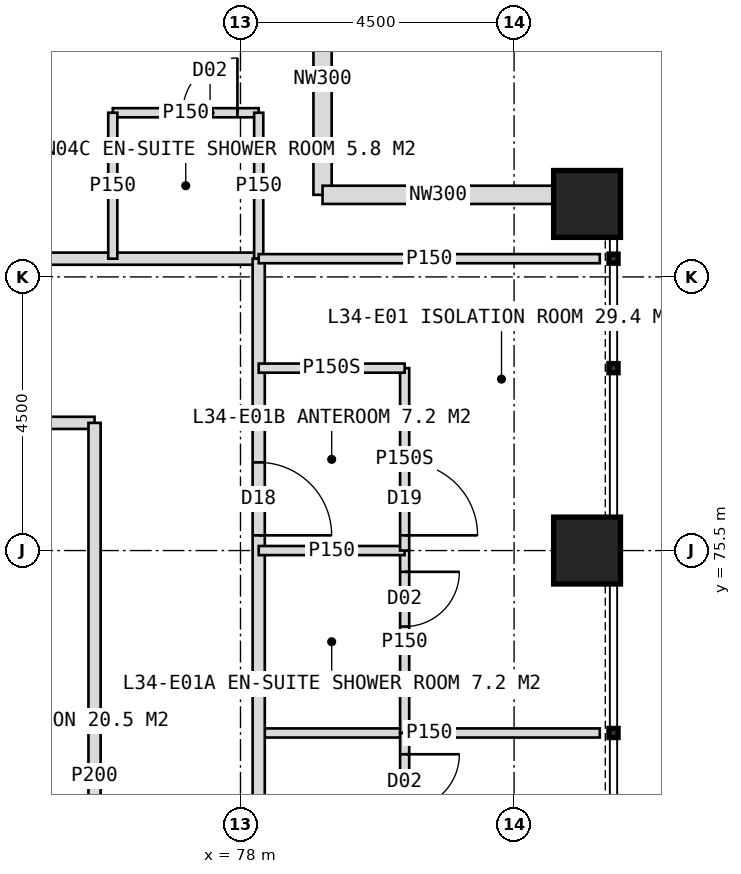
"""IFC4 building model, lengths in metres.
Left out: names, types, materials, properties, quantities, classifications, styles, units other than length and angle.
Written with IfcOpenShell. Run it as: python <this file> out.ifc"""

import sys

from ifc_helpers import new_model, si_unit, direction, frame, frame_2d, origin, origin_2d, place, context, subcontext, project, spatial, rectangle, hollow_rectangle, extrude, element, fill, save


model = new_model("IFC4")
c1 = context("Model", 3, precision=1e-05, world=origin(), true_north=direction((0.0, 1.0)))
c2 = subcontext(c1, "Body", "Model", "MODEL_VIEW")
j1 = project(units=[si_unit("LENGTHUNIT", "METRE"), si_unit("PLANEANGLEUNIT", "RADIAN")], contexts=[c1])
p1 = place(None, origin())
s1 = spatial("IfcSite", under=j1, at=p1, CompositionType="ELEMENT")
p2 = place(p1, origin())
s2 = spatial("IfcBuilding", under=s1, at=p2, CompositionType="ELEMENT")
p3 = place(p2, frame((0.0, 0.0, 144.0)))
s3 = spatial("IfcBuildingStorey", under=s2, at=p3, CompositionType="ELEMENT", Elevation=144.0)
for number, where, z_axis, x_axis in (
    (1, (83.7, 75.5, 0.0), (0.0, 0.0, 1.0), (1.0, 0.0, 0.0)),
    (2, (83.7, 81.2, 0.0), (0.0, 0.0, 1.0), (1.0, 0.0, 0.0)),
):
    element("IfcColumn", number, at=place(p3, frame(where, z_axis=z_axis, x_axis=x_axis)), inside=s3, PredefinedType="COLUMN", context=c2, shape_type="SweptSolid", body=[
        extrude(hollow_rectangle(XDim=1.1, YDim=1.1, WallThickness=0.1, at=origin_2d()), origin(), (0.0, 0.0, 1.0), 4.0),
    ])
for number, where, z_axis, x_axis in (
    (3, (79.35, 85.15, 0.0), (0.0, 0.0, 1.0), (0.0, -1.0, 0.0)),
    (4, (79.35, 81.35, 0.0), (0.0, 0.0, 1.0), (1.0, 0.0, 0.0)),
):
    element("IfcWall", number, at=place(p3, frame(where, z_axis=z_axis, x_axis=x_axis)), inside=s3, PredefinedType="ELEMENTEDWALL", context=c2, shape_type="SweptSolid", body=[
        extrude(rectangle(XDim=3.8, YDim=0.3, at=frame_2d((1.9, 0.0))), origin(), (0.0, 0.0, 1.0), 4.0),
    ])
p4 = place(p3, frame((41.7, 80.3, 0.0), z_axis=(0.0, 0.0, 1.0), x_axis=(1.0, 0.0, 0.0)))
e5 = element("IfcWall", 5, at=p4, inside=s3, PredefinedType="PARTITIONING", context=c2, shape_type="SweptSolid", body=[
    extrude(rectangle(XDim=36.6, YDim=0.2, at=frame_2d((18.3, 0.0))), origin(), (0.0, 0.0, 1.0), 3.75),
])
p5 = place(p4, frame((3.35, 0.0, 0.0)))
e6 = element("IfcOpeningElement", 6, at=p5, cuts=e5, PredefinedType="OPENING", context=c2, shape_type="SweptSolid", body=[
    extrude(rectangle(XDim=1.2, YDim=2.2, at=frame_2d((0.6, 1.1))), frame((0.0, 0.11, 0.0), z_axis=(0.0, -1.0, 0.0), x_axis=(1.0, 0.0, 0.0)), (0.0, 0.0, 1.0), 0.22),
])
p6 = place(p4, frame((8.8, 0.0, 0.0)))
e7 = element("IfcOpeningElement", 7, at=p6, cuts=e5, PredefinedType="OPENING", context=c2, shape_type="SweptSolid", body=[
    extrude(rectangle(XDim=1.0, YDim=2.1, at=frame_2d((0.5, 1.05))), frame((0.0, 0.11, 0.0), z_axis=(0.0, -1.0, 0.0), x_axis=(1.0, 0.0, 0.0)), (0.0, 0.0, 1.0), 0.22),
])
p7 = place(p4, frame((15.35, 0.0, 0.0)))
e8 = element("IfcOpeningElement", 8, at=p7, cuts=e5, PredefinedType="OPENING", context=c2, shape_type="SweptSolid", body=[
    extrude(rectangle(XDim=1.2, YDim=2.2, at=frame_2d((0.6, 1.1))), frame((0.0, 0.11, 0.0), z_axis=(0.0, -1.0, 0.0), x_axis=(1.0, 0.0, 0.0)), (0.0, 0.0, 1.0), 0.22),
])
p8 = place(p4, frame((22.45, 0.0, 0.0)))
e9 = element("IfcOpeningElement", 9, at=p8, cuts=e5, PredefinedType="OPENING", context=c2, shape_type="SweptSolid", body=[
    extrude(rectangle(XDim=1.2, YDim=2.2, at=frame_2d((0.6, 1.1))), frame((0.0, 0.11, 0.0), z_axis=(0.0, -1.0, 0.0), x_axis=(1.0, 0.0, 0.0)), (0.0, 0.0, 1.0), 0.22),
])
p9 = place(p3, frame((75.9, 82.7, 0.0), z_axis=(0.0, 0.0, 1.0), x_axis=(1.0, 0.0, 0.0)))
e10 = element("IfcWall", 10, at=p9, inside=s3, PredefinedType="PARTITIONING", context=c2, shape_type="SweptSolid", body=[
    extrude(rectangle(XDim=2.4, YDim=0.15, at=frame_2d((1.2, 0.0))), origin(), (0.0, 0.0, 1.0), 3.75),
])
p10 = place(p9, frame((1.15, 0.0, 0.0)))
e11 = element("IfcOpeningElement", 11, at=p10, cuts=e10, PredefinedType="OPENING", context=c2, shape_type="SweptSolid", body=[
    extrude(rectangle(XDim=0.9, YDim=2.1, at=frame_2d((0.45, 1.05))), frame((0.0, 0.085, 0.0), z_axis=(0.0, -1.0, 0.0), x_axis=(1.0, 0.0, 0.0)), (0.0, 0.0, 1.0), 0.17),
])
for number, where, z_axis, x_axis in (
    (12, (75.9, 80.3, 0.0), (0.0, 0.0, 1.0), (0.0, 1.0, 0.0)),
    (13, (78.3, 80.3, 0.0), (0.0, 0.0, 1.0), (0.0, 1.0, 0.0)),
):
    element("IfcWall", number, at=place(p3, frame(where, z_axis=z_axis, x_axis=x_axis)), inside=s3, PredefinedType="PARTITIONING", context=c2, shape_type="SweptSolid", body=[
        extrude(rectangle(XDim=2.4, YDim=0.15, at=frame_2d((1.2, 0.0))), origin(), (0.0, 0.0, 1.0), 3.75),
    ])
p11 = place(p3, frame((72.5, 77.6, 0.0), z_axis=(0.0, 0.0, 1.0), x_axis=(1.0, 0.0, 0.0)))
e14 = element("IfcWall", 14, at=p11, inside=s3, PredefinedType="PARTITIONING", context=c2, shape_type="SweptSolid", body=[
    extrude(rectangle(XDim=3.1, YDim=0.2, at=frame_2d((1.55, 0.0))), origin(), (0.0, 0.0, 1.0), 3.75),
])
p12 = place(p11, frame((0.25, 0.0, 0.0)))
e15 = element("IfcOpeningElement", 15, at=p12, cuts=e14, PredefinedType="OPENING", context=c2, shape_type="SweptSolid", body=[
    extrude(rectangle(XDim=1.0, YDim=2.1, at=frame_2d((0.5, 1.05))), frame((0.0, 0.11, 0.0), z_axis=(0.0, -1.0, 0.0), x_axis=(1.0, 0.0, 0.0)), (0.0, 0.0, 1.0), 0.22),
])
p13 = place(p3, frame((78.3, 72.5, 0.0), z_axis=(0.0, 0.0, 1.0), x_axis=(1.0, 0.0, 0.0)))
e16 = element("IfcWall", 16, at=p13, inside=s3, PredefinedType="PARTITIONING", context=c2, shape_type="SweptSolid", body=[
    extrude(rectangle(XDim=5.61, YDim=0.15, at=frame_2d((2.805, 0.0))), origin(), (0.0, 0.0, 1.0), 3.75),
])
p14 = place(p3, frame((78.3, 80.3, 0.0), z_axis=(0.0, 0.0, 1.0), x_axis=(0.0, -1.0, 0.0)))
e17 = element("IfcWall", 17, at=p14, inside=s3, PredefinedType="PARTITIONING", context=c2, shape_type="SweptSolid", body=[
    extrude(rectangle(XDim=36.6, YDim=0.2, at=frame_2d((18.3, 0.0))), origin(), (0.0, 0.0, 1.0), 3.75),
])
p15 = place(p14, frame((3.35, 0.0, 0.0)))
e18 = element("IfcOpeningElement", 18, at=p15, cuts=e17, PredefinedType="OPENING", context=c2, shape_type="SweptSolid", body=[
    extrude(rectangle(XDim=1.2, YDim=2.2, at=frame_2d((0.6, 1.1))), frame((0.0, 0.11, 0.0), z_axis=(0.0, -1.0, 0.0), x_axis=(1.0, 0.0, 0.0)), (0.0, 0.0, 1.0), 0.22),
])
p16 = place(p14, frame((11.05, 0.0, 0.0)))
e19 = element("IfcOpeningElement", 19, at=p16, cuts=e17, PredefinedType="OPENING", context=c2, shape_type="SweptSolid", body=[
    extrude(rectangle(XDim=1.2, YDim=2.2, at=frame_2d((0.6, 1.1))), frame((0.0, 0.11, 0.0), z_axis=(0.0, -1.0, 0.0), x_axis=(1.0, 0.0, 0.0)), (0.0, 0.0, 1.0), 0.22),
])
p17 = place(p14, frame((16.3, 0.0, 0.0)))
e20 = element("IfcOpeningElement", 20, at=p17, cuts=e17, PredefinedType="OPENING", context=c2, shape_type="SweptSolid", body=[
    extrude(rectangle(XDim=1.0, YDim=2.1, at=frame_2d((0.5, 1.05))), frame((0.0, 0.11, 0.0), z_axis=(0.0, -1.0, 0.0), x_axis=(1.0, 0.0, 0.0)), (0.0, 0.0, 1.0), 0.22),
])
p18 = place(p14, frame((21.55, 0.0, 0.0)))
e21 = element("IfcOpeningElement", 21, at=p18, cuts=e17, PredefinedType="OPENING", context=c2, shape_type="SweptSolid", body=[
    extrude(rectangle(XDim=1.2, YDim=2.2, at=frame_2d((0.6, 1.1))), frame((0.0, 0.11, 0.0), z_axis=(0.0, -1.0, 0.0), x_axis=(1.0, 0.0, 0.0)), (0.0, 0.0, 1.0), 0.22),
])
p19 = place(p14, frame((32.75, 0.0, 0.0)))
e22 = element("IfcOpeningElement", 22, at=p19, cuts=e17, PredefinedType="OPENING", context=c2, shape_type="SweptSolid", body=[
    extrude(rectangle(XDim=1.2, YDim=2.2, at=frame_2d((0.6, 1.1))), frame((0.0, 0.11, 0.0), z_axis=(0.0, -1.0, 0.0), x_axis=(1.0, 0.0, 0.0)), (0.0, 0.0, 1.0), 0.22),
])
p20 = place(p3, frame((78.3, 80.3, 0.0), z_axis=(0.0, 0.0, 1.0), x_axis=(1.0, 0.0, 0.0)))
e23 = element("IfcWall", 23, at=p20, inside=s3, PredefinedType="PARTITIONING", context=c2, shape_type="SweptSolid", body=[
    extrude(rectangle(XDim=5.61, YDim=0.15, at=frame_2d((2.805, 0.0))), origin(), (0.0, 0.0, 1.0), 3.75),
])
p21 = place(p3, frame((80.7, 75.5, 0.0), z_axis=(0.0, 0.0, 1.0), x_axis=(0.0, -1.0, 0.0)))
e24 = element("IfcWall", 24, at=p21, inside=s3, PredefinedType="PARTITIONING", context=c2, shape_type="SweptSolid", body=[
    extrude(rectangle(XDim=3.0, YDim=0.15, at=frame_2d((1.5, 0.0))), origin(), (0.0, 0.0, 1.0), 3.75),
])
p22 = place(p21, frame((0.35, 0.0, 0.0)))
e25 = element("IfcOpeningElement", 25, at=p22, cuts=e24, PredefinedType="OPENING", context=c2, shape_type="SweptSolid", body=[
    extrude(rectangle(XDim=0.9, YDim=2.1, at=frame_2d((0.45, 1.05))), frame((0.0, 0.085, 0.0), z_axis=(0.0, -1.0, 0.0), x_axis=(1.0, 0.0, 0.0)), (0.0, 0.0, 1.0), 0.17),
])
p23 = place(p3, frame((78.3, 75.5, 0.0), z_axis=(0.0, 0.0, 1.0), x_axis=(1.0, 0.0, 0.0)))
e26 = element("IfcWall", 26, at=p23, inside=s3, PredefinedType="PARTITIONING", context=c2, shape_type="SweptSolid", body=[
    extrude(rectangle(XDim=2.4, YDim=0.15, at=frame_2d((1.2, 0.0))), origin(), (0.0, 0.0, 1.0), 2.95),
])
p24 = place(p3, frame((80.7, 78.5, 0.0), z_axis=(0.0, 0.0, 1.0), x_axis=(0.0, -1.0, 0.0)))
e27 = element("IfcWall", 27, at=p24, inside=s3, PredefinedType="PARTITIONING", context=c2, shape_type="SweptSolid", body=[
    extrude(rectangle(XDim=3.0, YDim=0.15, at=frame_2d((1.5, 0.0))), origin(), (0.0, 0.0, 1.0), 3.75),
])
p25 = place(p24, frame((1.55, 0.0, 0.0)))
e28 = element("IfcOpeningElement", 28, at=p25, cuts=e27, PredefinedType="OPENING", context=c2, shape_type="SweptSolid", body=[
    extrude(rectangle(XDim=1.2, YDim=2.2, at=frame_2d((0.6, 1.1))), frame((0.0, 0.085, 0.0), z_axis=(0.0, -1.0, 0.0), x_axis=(1.0, 0.0, 0.0)), (0.0, 0.0, 1.0), 0.17),
])
p26 = place(p3, frame((78.3, 78.5, 0.0), z_axis=(0.0, 0.0, 1.0), x_axis=(1.0, 0.0, 0.0)))
e29 = element("IfcWall", 29, at=p26, inside=s3, PredefinedType="PARTITIONING", context=c2, shape_type="SweptSolid", body=[
    extrude(rectangle(XDim=2.4, YDim=0.15, at=frame_2d((1.2, 0.0))), origin(), (0.0, 0.0, 1.0), 3.75),
])
p27 = place(p3, frame((80.7, 72.5, 0.0), z_axis=(0.0, 0.0, 1.0), x_axis=(0.0, -1.0, 0.0)))
e30 = element("IfcWall", 30, at=p27, inside=s3, PredefinedType="PARTITIONING", context=c2, shape_type="SweptSolid", body=[
    extrude(rectangle(XDim=3.0, YDim=0.15, at=frame_2d((1.5, 0.0))), origin(), (0.0, 0.0, 1.0), 3.75),
])
p28 = place(p27, frame((0.35, 0.0, 0.0)))
e31 = element("IfcOpeningElement", 31, at=p28, cuts=e30, PredefinedType="OPENING", context=c2, shape_type="SweptSolid", body=[
    extrude(rectangle(XDim=0.9, YDim=2.1, at=frame_2d((0.45, 1.05))), frame((0.0, 0.085, 0.0), z_axis=(0.0, -1.0, 0.0), x_axis=(1.0, 0.0, 0.0)), (0.0, 0.0, 1.0), 0.17),
])
p29 = place(p3, frame((75.6, 77.6, 0.0), z_axis=(0.0, 0.0, 1.0), x_axis=(0.0, -1.0, 0.0)))
e32 = element("IfcWall", 32, at=p29, inside=s3, PredefinedType="PARTITIONING", context=c2, shape_type="SweptSolid", body=[
    extrude(rectangle(XDim=11.6, YDim=0.2, at=frame_2d((5.8, 0.0))), origin(), (0.0, 0.0, 1.0), 3.75),
])
p30 = place(p29, frame((8.6, 0.0, 0.0)))
e33 = element("IfcOpeningElement", 33, at=p30, cuts=e32, PredefinedType="OPENING", context=c2, shape_type="SweptSolid", body=[
    extrude(rectangle(XDim=1.0, YDim=2.1, at=frame_2d((0.5, 1.05))), frame((0.0, 0.11, 0.0), z_axis=(0.0, -1.0, 0.0), x_axis=(1.0, 0.0, 0.0)), (0.0, 0.0, 1.0), 0.22),
])
p31 = place(p10, origin())
e34 = element("IfcDoor", 34, at=p31, inside=s3, OperationType="SINGLE_SWING_RIGHT", PredefinedType="DOOR", context=c2, shape_type="SweptSolid", body=[
    extrude(rectangle(XDim=0.9, YDim=2.1, at=frame_2d((0.45, 1.05))), frame((0.0, 0.025, 0.0), z_axis=(0.0, -1.0, 0.0), x_axis=(1.0, 0.0, 0.0)), (0.0, 0.0, 1.0), 0.05),
])
fill(e11, e34)
p32 = place(p25, origin())
e35 = element("IfcDoor", 35, at=p32, inside=s3, OperationType="SINGLE_SWING_RIGHT", PredefinedType="DOOR", context=c2, shape_type="SweptSolid", body=[
    extrude(rectangle(XDim=1.2, YDim=2.2, at=frame_2d((0.6, 1.1))), frame((0.0, 0.025, 0.0), z_axis=(0.0, -1.0, 0.0), x_axis=(1.0, 0.0, 0.0)), (0.0, 0.0, 1.0), 0.05),
])
fill(e28, e35)
p33 = place(p15, origin())
e36 = element("IfcDoor", 36, at=p33, inside=s3, OperationType="SINGLE_SWING_RIGHT", PredefinedType="DOOR", context=c2, shape_type="SweptSolid", body=[
    extrude(rectangle(XDim=1.2, YDim=2.2, at=frame_2d((0.6, 1.1))), frame((0.0, 0.025, 0.0), z_axis=(0.0, -1.0, 0.0), x_axis=(1.0, 0.0, 0.0)), (0.0, 0.0, 1.0), 0.05),
])
fill(e18, e36)
p34 = place(p22, origin())
e37 = element("IfcDoor", 37, at=p34, inside=s3, OperationType="SINGLE_SWING_LEFT", PredefinedType="DOOR", context=c2, shape_type="SweptSolid", body=[
    extrude(rectangle(XDim=0.9, YDim=2.1, at=frame_2d((0.45, 1.05))), frame((0.0, 0.025, 0.0), z_axis=(0.0, -1.0, 0.0), x_axis=(1.0, 0.0, 0.0)), (0.0, 0.0, 1.0), 0.05),
])
fill(e25, e37)
p35 = place(p28, origin())
e38 = element("IfcDoor", 38, at=p35, inside=s3, OperationType="SINGLE_SWING_LEFT", PredefinedType="DOOR", context=c2, shape_type="SweptSolid", body=[
    extrude(rectangle(XDim=0.9, YDim=2.1, at=frame_2d((0.45, 1.05))), frame((0.0, 0.025, 0.0), z_axis=(0.0, -1.0, 0.0), x_axis=(1.0, 0.0, 0.0)), (0.0, 0.0, 1.0), 0.05),
])
fill(e31, e38)
save(model, sys.argv[1])
